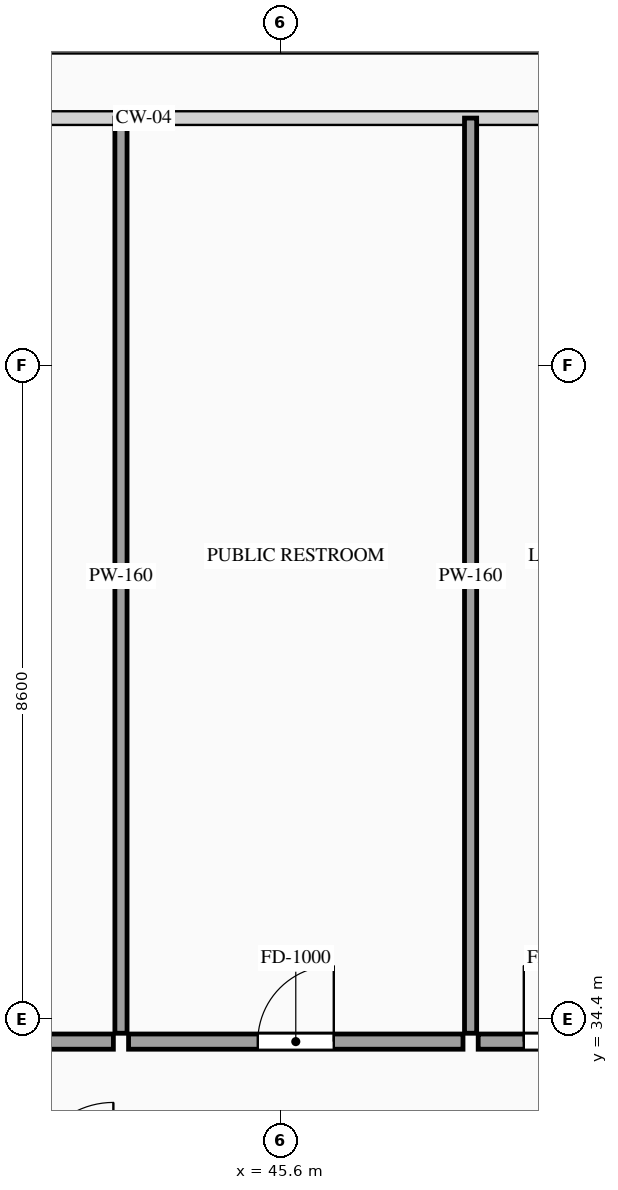
"""IFC4 building model, lengths in metres.
Left out: names, types, materials, properties, quantities, classifications, styles, units other than length and angle.
Written with IfcOpenShell. Run it as: python <this file> out.ifc"""

import sys

from ifc_helpers import new_model, si_unit, direction, frame, frame_2d, origin, place, context, subcontext, project, spatial, rectangle, extrude, source, transform, mapped, element, fill, save


model = new_model("IFC4")
c1 = context("Model", 3, precision=1e-05, world=origin(), true_north=direction((0.0, 1.0)))
c2 = subcontext(c1, "Body", "Model", "MODEL_VIEW")
j1 = project(units=[si_unit("LENGTHUNIT", "METRE"), si_unit("PLANEANGLEUNIT", "RADIAN")], contexts=[c1])
p1 = place(None, origin())
s1 = spatial("IfcSite", under=j1, at=p1, CompositionType="ELEMENT")
p2 = place(p1, origin())
s2 = spatial("IfcBuilding", under=s1, at=p2, CompositionType="ELEMENT")
p3 = place(p2, frame((0.0, 0.0, 259.1)))
s3 = spatial("IfcBuildingStorey", under=s2, at=p3, CompositionType="ELEMENT", Elevation=259.1)
p4 = place(p3, frame((38.0, 34.1, 0.0), z_axis=(0.0, 0.0, 1.0), x_axis=(1.0, 0.0, 0.0)))
e1 = element("IfcWall", 1, at=p4, inside=s3, PredefinedType="PARTITIONING", context=c2, shape_type="SweptSolid", body=[
    extrude(rectangle(XDim=5.4, YDim=0.2, at=frame_2d((2.7, 0.0))), origin(), (0.0, 0.0, 1.0), 4.12),
])
p5 = place(p4, frame((2.2, 0.0, 0.0)))
e2 = element("IfcOpeningElement", 2, at=p5, cuts=e1, PredefinedType="OPENING", context=c2, shape_type="SweptSolid", body=[
    extrude(rectangle(XDim=1.0, YDim=2.2, at=frame_2d((0.5, 1.1))), frame((0.0, 0.115, 0.0), z_axis=(0.0, -1.0, 0.0), x_axis=(1.0, 0.0, 0.0)), (0.0, 0.0, 1.0), 0.23),
])
m1 = source(origin(), c2, "Body", "SweptSolid", [
    extrude(rectangle(XDim=12.04, YDim=0.16, at=frame_2d((6.02, 0.0))), origin(), (0.0, 0.0, 1.0), 4.12),
])
p6 = place(p3, frame((43.5, 34.21, 0.0), z_axis=(0.0, 0.0, 1.0), x_axis=(0.0, 1.0, 0.0)))
e3 = element("IfcWall", 3, at=p6, inside=s3, PredefinedType="PARTITIONING", context=c2, shape_type="MappedRepresentation", body=[
    mapped(m1, transform((0.0, 0.0, 0.0), scale=1.0)),
])
p7 = place(p3, frame((43.6, 34.1, 0.0), z_axis=(0.0, 0.0, 1.0), x_axis=(1.0, 0.0, 0.0)))
e4 = element("IfcWall", 4, at=p7, inside=s3, PredefinedType="PARTITIONING", context=c2, shape_type="SweptSolid", body=[
    extrude(rectangle(XDim=4.4, YDim=0.2, at=frame_2d((2.2, 0.0))), origin(), (0.0, 0.0, 1.0), 4.12),
])
p8 = place(p7, frame((1.7, 0.0, 0.0)))
e5 = element("IfcOpeningElement", 5, at=p8, cuts=e4, PredefinedType="OPENING", context=c2, shape_type="SweptSolid", body=[
    extrude(rectangle(XDim=1.0, YDim=2.2, at=frame_2d((0.5, 1.1))), frame((0.0, 0.115, 0.0), z_axis=(0.0, -1.0, 0.0), x_axis=(1.0, 0.0, 0.0)), (0.0, 0.0, 1.0), 0.23),
])
p9 = place(p3, frame((48.1, 34.21, 0.0), z_axis=(0.0, 0.0, 1.0), x_axis=(0.0, 1.0, 0.0)))
e6 = element("IfcWall", 6, at=p9, inside=s3, PredefinedType="PARTITIONING", context=c2, shape_type="MappedRepresentation", body=[
    mapped(m1, transform((0.0, 0.0, 0.0), scale=1.0)),
])
p10 = place(p3, frame((48.2, 34.1, 0.0), z_axis=(0.0, 0.0, 1.0), x_axis=(1.0, 0.0, 0.0)))
e7 = element("IfcWall", 7, at=p10, inside=s3, PredefinedType="PARTITIONING", context=c2, shape_type="SweptSolid", body=[
    extrude(rectangle(XDim=2.2, YDim=0.2, at=frame_2d((1.1, 0.0))), origin(), (0.0, 0.0, 1.0), 4.12),
])
p11 = place(p10, frame((0.6, 0.0, 0.0)))
e8 = element("IfcOpeningElement", 8, at=p11, cuts=e7, PredefinedType="OPENING", context=c2, shape_type="SweptSolid", body=[
    extrude(rectangle(XDim=1.0, YDim=2.2, at=frame_2d((0.5, 1.1))), frame((0.0, 0.115, 0.0), z_axis=(0.0, -1.0, 0.0), x_axis=(1.0, 0.0, 0.0)), (0.0, 0.0, 1.0), 0.23),
])
m2 = source(origin(), c2, "Body", "SweptSolid", [
    extrude(rectangle(XDim=1.0, YDim=2.2, at=frame_2d((0.5, 1.1))), frame((0.0, 0.025, 0.0), z_axis=(0.0, -1.0, 0.0), x_axis=(1.0, 0.0, 0.0)), (0.0, 0.0, 1.0), 0.05),
])
p12 = place(p8, origin())
e9 = element("IfcDoor", 9, at=p12, inside=s3, OperationType="SINGLE_SWING_RIGHT", PredefinedType="DOOR", context=c2, shape_type="MappedRepresentation", body=[
    mapped(m2, transform((0.0, 0.0, 0.0), scale=1.0)),
])
fill(e5, e9)
p13 = place(p11, origin())
e10 = element("IfcDoor", 10, at=p13, inside=s3, OperationType="SINGLE_SWING_LEFT", PredefinedType="DOOR", context=c2, shape_type="MappedRepresentation", body=[
    mapped(m2, transform((0.0, 0.0, 0.0), scale=1.0)),
])
fill(e8, e10)
save(model, sys.argv[1])
